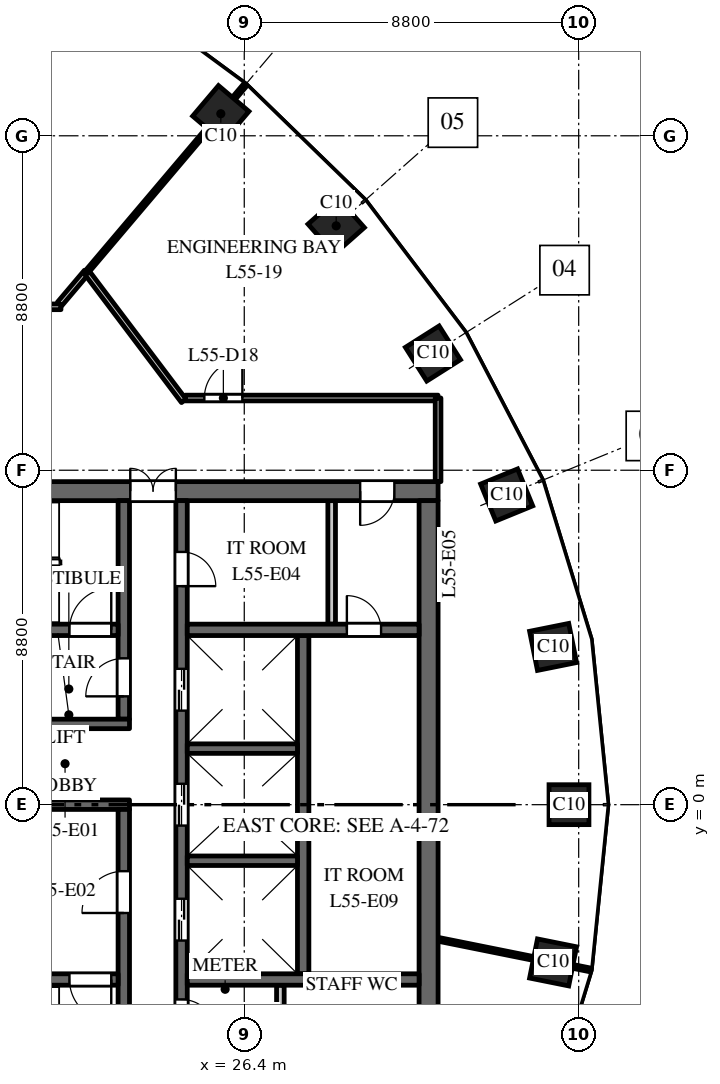
"""IFC4 building model, lengths in metres.
Left out: names, types, materials, properties, quantities, classifications, styles, units other than length and angle.
Written with IfcOpenShell. Run it as: python <this file> out.ifc"""

import sys

from ifc_helpers import new_model, si_unit, direction, frame, frame_2d, origin, origin_2d, place, context, subcontext, project, spatial, rectangle, extrude, element, fill, save


model = new_model("IFC4")
c1 = context("Model", 3, precision=1e-05, world=origin(), true_north=direction((0.0, 1.0)))
c2 = subcontext(c1, "Body", "Model", "MODEL_VIEW")
j1 = project(units=[si_unit("LENGTHUNIT", "METRE"), si_unit("PLANEANGLEUNIT", "RADIAN")], contexts=[c1])
p1 = place(None, origin())
s1 = spatial("IfcSite", under=j1, at=p1, CompositionType="ELEMENT")
p2 = place(p1, origin())
s2 = spatial("IfcBuilding", under=s1, at=p2, CompositionType="ELEMENT")
p3 = place(p2, frame((0.0, 0.0, 261.5)))
s3 = spatial("IfcBuildingStorey", under=s2, at=p3, CompositionType="ELEMENT", Elevation=261.5)
for number, where, z_axis, x_axis in (
    (1, (34.945, 0.0, 0.0), (0.0, 0.0, 1.0), (0.0, 1.0, 0.0)),
    (2, (34.527, 4.151, 0.0), (0.0, 0.0, 1.0), (-0.197, 0.98, 0.0)),
    (3, (33.305, 8.149, 0.0), (0.0, 0.0, 1.0), (-0.379, 0.925, 0.0)),
    (4, (31.365, 11.871, 0.0), (0.0, 0.0, 1.0), (-0.535, 0.845, 0.0)),
    (5, (28.819, 15.23, 0.0), (0.0, 0.0, 1.0), (-0.663, 0.749, 0.0)),
    (6, (25.783, 18.18, 0.0), (0.0, 0.0, 1.0), (-0.763, 0.646, 0.0)),
    (7, (34.527, -4.151, 0.0), (0.0, 0.0, 1.0), (0.197, 0.98, 0.0)),
):
    element("IfcColumn", number, at=place(p3, frame(where, z_axis=z_axis, x_axis=x_axis)), inside=s3, PredefinedType="COLUMN", context=c2, shape_type="SweptSolid", body=[
        extrude(rectangle(XDim=1.05, YDim=1.05, at=origin_2d()), origin(), (0.0, 0.0, 1.0), 4.0),
    ])
p4 = place(p3, frame((16.5, 8.25, 0.0), z_axis=(0.0, 0.0, 1.0), x_axis=(1.0, 0.0, 0.0)))
e8 = element("IfcWall", 8, at=p4, inside=s3, PredefinedType="SHEAR", context=c2, shape_type="SweptSolid", body=[
    extrude(rectangle(XDim=15.0, YDim=0.5, at=frame_2d((7.5, 0.0))), origin(), (0.0, 0.0, 1.0), 3.7),
])
p5 = place(p4, frame((6.9, 0.0, 0.0)))
e9 = element("IfcOpeningElement", 9, at=p5, cuts=e8, PredefinedType="OPENING", context=c2, shape_type="SweptSolid", body=[
    extrude(rectangle(XDim=1.2, YDim=2.1, at=frame_2d((0.6, 1.05))), frame((0.0, 0.26, 0.0), z_axis=(0.0, -1.0, 0.0), x_axis=(1.0, 0.0, 0.0)), (0.0, 0.0, 1.0), 0.52),
])
p6 = place(p4, frame((12.95, 0.0, 0.0)))
e10 = element("IfcOpeningElement", 10, at=p6, cuts=e8, PredefinedType="OPENING", context=c2, shape_type="SweptSolid", body=[
    extrude(rectangle(XDim=0.9, YDim=2.1, at=frame_2d((0.45, 1.05))), frame((0.0, 0.26, 0.0), z_axis=(0.0, -1.0, 0.0), x_axis=(1.0, 0.0, 0.0)), (0.0, 0.0, 1.0), 0.52),
])
p7 = place(p3, frame((27.95, -4.45, 0.0), z_axis=(0.0, 0.0, 1.0), x_axis=(0.0, 1.0, 0.0)))
e11 = element("IfcWall", 11, at=p7, inside=s3, PredefinedType="SHEAR", context=c2, shape_type="SweptSolid", body=[
    extrude(rectangle(XDim=8.9, YDim=0.3, at=frame_2d((4.45, 0.0))), origin(), (0.0, 0.0, 1.0), 3.7),
])
p8 = place(p3, frame((24.75, -8.0, 0.0), z_axis=(0.0, 0.0, 1.0), x_axis=(0.0, 1.0, 0.0)))
e12 = element("IfcWall", 12, at=p8, inside=s3, PredefinedType="SHEAR", context=c2, shape_type="SweptSolid", body=[
    extrude(rectangle(XDim=16.0, YDim=0.3, at=frame_2d((8.0, 0.0))), origin(), (0.0, 0.0, 1.0), 3.7),
])
p9 = place(p8, frame((4.425, 0.0, 0.0)))
e13 = element("IfcOpeningElement", 13, at=p9, cuts=e12, PredefinedType="OPENING", context=c2, shape_type="SweptSolid", body=[
    extrude(rectangle(XDim=1.1, YDim=2.1, at=frame_2d((0.55, 1.05))), frame((0.0, 0.16, 0.0), z_axis=(0.0, -1.0, 0.0), x_axis=(1.0, 0.0, 0.0)), (0.0, 0.0, 1.0), 0.32),
])
p10 = place(p8, frame((7.45, 0.0, 0.0)))
e14 = element("IfcOpeningElement", 14, at=p10, cuts=e12, PredefinedType="OPENING", context=c2, shape_type="SweptSolid", body=[
    extrude(rectangle(XDim=1.1, YDim=2.1, at=frame_2d((0.55, 1.05))), frame((0.0, 0.16, 0.0), z_axis=(0.0, -1.0, 0.0), x_axis=(1.0, 0.0, 0.0)), (0.0, 0.0, 1.0), 0.32),
])
p11 = place(p8, frame((10.475, 0.0, 0.0)))
e15 = element("IfcOpeningElement", 15, at=p11, cuts=e12, PredefinedType="OPENING", context=c2, shape_type="SweptSolid", body=[
    extrude(rectangle(XDim=1.1, YDim=2.1, at=frame_2d((0.55, 1.05))), frame((0.0, 0.16, 0.0), z_axis=(0.0, -1.0, 0.0), x_axis=(1.0, 0.0, 0.0)), (0.0, 0.0, 1.0), 0.32),
])
p12 = place(p8, frame((13.75, 0.0, 0.0)))
e16 = element("IfcOpeningElement", 16, at=p12, cuts=e12, PredefinedType="OPENING", context=c2, shape_type="SweptSolid", body=[
    extrude(rectangle(XDim=0.9, YDim=2.1, at=frame_2d((0.45, 1.05))), frame((0.0, 0.16, 0.0), z_axis=(0.0, -1.0, 0.0), x_axis=(1.0, 0.0, 0.0)), (0.0, 0.0, 1.0), 0.32),
])
p13 = place(p8, frame((1.975, 0.0, 0.0)))
e17 = element("IfcOpeningElement", 17, at=p13, cuts=e12, PredefinedType="OPENING", context=c2, shape_type="SweptSolid", body=[
    extrude(rectangle(XDim=0.9, YDim=2.1, at=frame_2d((0.45, 1.05))), frame((0.0, 0.16, 0.0), z_axis=(0.0, -1.0, 0.0), x_axis=(1.0, 0.0, 0.0)), (0.0, 0.0, 1.0), 0.32),
])
p14 = place(p8, frame((0.35, 0.0, 0.0)))
e18 = element("IfcOpeningElement", 18, at=p14, cuts=e12, PredefinedType="OPENING", context=c2, shape_type="SweptSolid", body=[
    extrude(rectangle(XDim=0.9, YDim=2.1, at=frame_2d((0.45, 1.05))), frame((0.0, 0.16, 0.0), z_axis=(0.0, -1.0, 0.0), x_axis=(1.0, 0.0, 0.0)), (0.0, 0.0, 1.0), 0.32),
])
p15 = place(p3, frame((20.1, 0.0, 0.0), z_axis=(0.0, 0.0, 1.0), x_axis=(1.0, 0.0, 0.0)))
e19 = element("IfcWall", 19, at=p15, inside=s3, PredefinedType="SHEAR", context=c2, shape_type="SweptSolid", body=[
    extrude(rectangle(XDim=3.28, YDim=0.25, at=frame_2d((1.64, 0.0))), origin(), (0.0, 0.0, 1.0), 3.7),
])
p16 = place(p3, frame((31.25, -8.0, 0.0), z_axis=(0.0, 0.0, 1.0), x_axis=(0.0, 1.0, 0.0)))
e20 = element("IfcWall", 20, at=p16, inside=s3, PredefinedType="SHEAR", context=c2, shape_type="SweptSolid", body=[
    extrude(rectangle(XDim=16.0, YDim=0.5, at=frame_2d((8.0, 0.0))), origin(), (0.0, 0.0, 1.0), 3.7),
])
p17 = place(p3, frame((24.9, 4.6, 0.0), z_axis=(0.0, 0.0, 1.0), x_axis=(1.0, 0.0, 0.0)))
e21 = element("IfcWall", 21, at=p17, inside=s3, PredefinedType="SHEAR", context=c2, shape_type="SweptSolid", body=[
    extrude(rectangle(XDim=6.1, YDim=0.3, at=frame_2d((3.05, 0.0))), origin(), (0.0, 0.0, 1.0), 3.7),
])
p18 = place(p17, frame((4.2, 0.0, 0.0)))
e22 = element("IfcOpeningElement", 22, at=p18, cuts=e21, PredefinedType="OPENING", context=c2, shape_type="SweptSolid", body=[
    extrude(rectangle(XDim=0.9, YDim=2.1, at=frame_2d((0.45, 1.05))), frame((0.0, 0.16, 0.0), z_axis=(0.0, -1.0, 0.0), x_axis=(1.0, 0.0, 0.0)), (0.0, 0.0, 1.0), 0.32),
])
for number, where, z_axis, x_axis in (
    (23, (28.7, 4.75, 0.0), (0.0, 0.0, 1.0), (0.0, 1.0, 0.0)),
    (24, (27.35, -8.0, 0.0), (0.0, 0.0, 1.0), (0.0, 1.0, 0.0)),
):
    element("IfcWall", number, at=place(p3, frame(where, z_axis=z_axis, x_axis=x_axis)), inside=s3, PredefinedType="PARTITIONING", context=c2, shape_type="SweptSolid", body=[
        extrude(rectangle(XDim=3.25, YDim=0.2, at=frame_2d((1.625, 0.0))), origin(), (0.0, 0.0, 1.0), 3.7),
    ])
p19 = place(p3, frame((24.9, -4.6, 0.0), z_axis=(0.0, 0.0, 1.0), x_axis=(1.0, 0.0, 0.0)))
e25 = element("IfcWall", 25, at=p19, inside=s3, PredefinedType="SHEAR", context=c2, shape_type="SweptSolid", body=[
    extrude(rectangle(XDim=6.1, YDim=0.3, at=frame_2d((3.05, 0.0))), origin(), (0.0, 0.0, 1.0), 3.7),
])
for number, where, z_axis, x_axis in (
    (26, (24.9, -1.475, 0.0), (0.0, 0.0, 1.0), (1.0, 0.0, 0.0)),
    (27, (24.9, 1.475, 0.0), (0.0, 0.0, 1.0), (1.0, 0.0, 0.0)),
):
    element("IfcWall", number, at=place(p3, frame(where, z_axis=z_axis, x_axis=x_axis)), inside=s3, PredefinedType="SHEAR", context=c2, shape_type="SweptSolid", body=[
        extrude(rectangle(XDim=2.9, YDim=0.25, at=frame_2d((1.45, 0.0))), origin(), (0.0, 0.0, 1.0), 3.7),
    ])
p20 = place(p3, frame((23.23, 2.25, 0.0), z_axis=(0.0, 0.0, 1.0), x_axis=(0.0, 1.0, 0.0)))
e28 = element("IfcWall", 28, at=p20, inside=s3, PredefinedType="SHEAR", context=c2, shape_type="SweptSolid", body=[
    extrude(rectangle(XDim=5.75, YDim=0.3, at=frame_2d((2.875, 0.0))), origin(), (0.0, 0.0, 1.0), 3.7),
])
p21 = place(p20, frame((0.6, 0.0, 0.0)))
e29 = element("IfcOpeningElement", 29, at=p21, cuts=e28, PredefinedType="OPENING", context=c2, shape_type="SweptSolid", body=[
    extrude(rectangle(XDim=1.0, YDim=2.1, at=frame_2d((0.5, 1.05))), frame((0.0, 0.16, 0.0), z_axis=(0.0, -1.0, 0.0), x_axis=(1.0, 0.0, 0.0)), (0.0, 0.0, 1.0), 0.32),
])
p22 = place(p3, frame((23.23, -8.0, 0.0), z_axis=(0.0, 0.0, 1.0), x_axis=(0.0, 1.0, 0.0)))
e30 = element("IfcWall", 30, at=p22, inside=s3, PredefinedType="SHEAR", context=c2, shape_type="SweptSolid", body=[
    extrude(rectangle(XDim=7.875, YDim=0.3, at=frame_2d((3.938, 0.0))), origin(), (0.0, 0.0, 1.0), 3.7),
])
p23 = place(p22, frame((5.15, 0.0, 0.0)))
e31 = element("IfcOpeningElement", 31, at=p23, cuts=e30, PredefinedType="OPENING", context=c2, shape_type="SweptSolid", body=[
    extrude(rectangle(XDim=1.1, YDim=2.1, at=frame_2d((0.55, 1.05))), frame((0.0, 0.16, 0.0), z_axis=(0.0, -1.0, 0.0), x_axis=(1.0, 0.0, 0.0)), (0.0, 0.0, 1.0), 0.32),
])
p24 = place(p3, frame((16.9, 4.6, 0.0), z_axis=(0.0, 0.0, 1.0), x_axis=(1.0, 0.0, 0.0)))
e32 = element("IfcWall", 32, at=p24, inside=s3, PredefinedType="SHEAR", context=c2, shape_type="SweptSolid", body=[
    extrude(rectangle(XDim=6.18, YDim=0.3, at=frame_2d((3.09, 0.0))), origin(), (0.0, 0.0, 1.0), 3.7),
])
p25 = place(p24, frame((4.9, 0.0, 0.0)))
e33 = element("IfcOpeningElement", 33, at=p25, cuts=e32, PredefinedType="OPENING", context=c2, shape_type="SweptSolid", body=[
    extrude(rectangle(XDim=1.1, YDim=2.1, at=frame_2d((0.55, 1.05))), frame((0.0, 0.16, 0.0), z_axis=(0.0, -1.0, 0.0), x_axis=(1.0, 0.0, 0.0)), (0.0, 0.0, 1.0), 0.32),
])
p26 = place(p3, frame((16.9, -4.6, 0.0), z_axis=(0.0, 0.0, 1.0), x_axis=(1.0, 0.0, 0.0)))
e34 = element("IfcWall", 34, at=p26, inside=s3, PredefinedType="SHEAR", context=c2, shape_type="SweptSolid", body=[
    extrude(rectangle(XDim=6.18, YDim=0.3, at=frame_2d((3.09, 0.0))), origin(), (0.0, 0.0, 1.0), 3.7),
])
p27 = place(p26, frame((4.9, 0.0, 0.0)))
e35 = element("IfcOpeningElement", 35, at=p27, cuts=e34, PredefinedType="OPENING", context=c2, shape_type="SweptSolid", body=[
    extrude(rectangle(XDim=1.1, YDim=2.1, at=frame_2d((0.55, 1.05))), frame((0.0, 0.16, 0.0), z_axis=(0.0, -1.0, 0.0), x_axis=(1.0, 0.0, 0.0)), (0.0, 0.0, 1.0), 0.32),
])
p28 = place(p3, frame((20.85, 2.125, 0.0), z_axis=(0.0, 0.0, 1.0), x_axis=(1.0, 0.0, 0.0)))
e36 = element("IfcWall", 36, at=p28, inside=s3, PredefinedType="SHEAR", context=c2, shape_type="SweptSolid", body=[
    extrude(rectangle(XDim=2.53, YDim=0.25, at=frame_2d((1.265, 0.0))), origin(), (0.0, 0.0, 1.0), 3.7),
])
p29 = place(p3, frame((7.524, 13.1, 0.0), z_axis=(0.0, 0.0, 1.0), x_axis=(1.0, 0.0, 0.0)))
e37 = element("IfcWall", 37, at=p29, inside=s3, PredefinedType="PARTITIONING", context=c2, shape_type="SweptSolid", body=[
    extrude(rectangle(XDim=14.052, YDim=0.15, at=frame_2d((7.026, 0.0))), origin(), (0.0, 0.0, 1.0), 2.85),
])
p30 = place(p29, frame((0.554, 0.0, 0.0)))
e38 = element("IfcOpeningElement", 38, at=p30, cuts=e37, PredefinedType="OPENING", context=c2, shape_type="SweptSolid", body=[
    extrude(rectangle(XDim=1.0, YDim=2.1, at=frame_2d((0.5, 1.05))), frame((0.0, 0.085, 0.0), z_axis=(0.0, -1.0, 0.0), x_axis=(1.0, 0.0, 0.0)), (0.0, 0.0, 1.0), 0.17),
])
p31 = place(p3, frame((21.541, 13.175, 0.0), z_axis=(0.0, 0.0, 1.0), x_axis=(0.646460291141, 0.762947633837, 0.0)))
e39 = element("IfcWall", 39, at=p31, inside=s3, PredefinedType="PARTITIONING", context=c2, shape_type="SweptSolid", body=[
    extrude(rectangle(XDim=1.098, YDim=0.15, at=frame_2d((0.549, 0.0))), origin(), (0.0, 0.0, 1.0), 3.7),
])
p32 = place(p3, frame((22.251, 14.013, 0.0), z_axis=(0.0, 0.0, 1.0), x_axis=(0.602435944628, -0.798167233492, 0.0)))
e40 = element("IfcWall", 40, at=p32, inside=s3, PredefinedType="PARTITIONING", context=c2, shape_type="SweptSolid", body=[
    extrude(rectangle(XDim=4.245, YDim=0.15, at=frame_2d((2.122, 0.0))), origin(), (0.0, 0.0, 1.0), 2.75),
])
p33 = place(p3, frame((22.251, 14.013, 0.0), z_axis=(0.0, 0.0, 1.0), x_axis=(0.646448300096, 0.76295779392, 0.0)))
e41 = element("IfcWall", 41, at=p33, inside=s3, PredefinedType="PARTITIONING", context=c2, shape_type="SweptSolid", body=[
    extrude(rectangle(XDim=6.465, YDim=0.1, at=frame_2d((3.232, 0.0))), origin(), (0.0, 0.0, 1.0), 3.0),
])
p34 = place(p3, frame((24.845, 10.7, 0.0), z_axis=(0.0, 0.0, 1.0), x_axis=(1.0, 0.0, 0.0)))
e42 = element("IfcWall", 42, at=p34, inside=s3, PredefinedType="PARTITIONING", context=c2, shape_type="SweptSolid", body=[
    extrude(rectangle(XDim=6.655, YDim=0.15, at=frame_2d((3.328, 0.0))), origin(), (0.0, 0.0, 1.0), 3.0),
])
p35 = place(p34, frame((0.505, 0.0, 0.0)))
e43 = element("IfcOpeningElement", 43, at=p35, cuts=e42, PredefinedType="OPENING", context=c2, shape_type="SweptSolid", body=[
    extrude(rectangle(XDim=1.0, YDim=2.1, at=frame_2d((0.5, 1.05))), frame((0.0, 0.085, 0.0), z_axis=(0.0, -1.0, 0.0), x_axis=(1.0, 0.0, 0.0)), (0.0, 0.0, 1.0), 0.17),
])
p36 = place(p3, frame((31.5, -3.542, 0.0), z_axis=(0.0, 0.0, 1.0), x_axis=(0.980357474535, -0.197228857227, 0.0)))
e44 = element("IfcWall", 44, at=p36, inside=s3, PredefinedType="PARTITIONING", context=c2, shape_type="SweptSolid", body=[
    extrude(rectangle(XDim=4.092, YDim=0.1, at=frame_2d((2.046, 0.0))), origin(), (0.0, 0.0, 1.0), 3.0),
])
p37 = place(p3, frame((31.5, 8.5, 0.0), z_axis=(0.0, 0.0, 1.0), x_axis=(0.0, 1.0, 0.0)))
e45 = element("IfcWall", 45, at=p37, inside=s3, PredefinedType="PARTITIONING", context=c2, shape_type="SweptSolid", body=[
    extrude(rectangle(XDim=2.2, YDim=0.15, at=frame_2d((1.1, 0.0))), origin(), (0.0, 0.0, 1.0), 3.0),
])
p38 = place(p9, origin())
e46 = element("IfcDoor", 46, at=p38, inside=s3, OperationType="DOUBLE_DOOR_SLIDING", PredefinedType="DOOR", context=c2, shape_type="SweptSolid", body=[
    extrude(rectangle(XDim=1.1, YDim=2.1, at=frame_2d((0.55, 1.05))), frame((0.0, 0.025, 0.0), z_axis=(0.0, -1.0, 0.0), x_axis=(1.0, 0.0, 0.0)), (0.0, 0.0, 1.0), 0.05),
])
fill(e13, e46)
p39 = place(p10, origin())
e47 = element("IfcDoor", 47, at=p39, inside=s3, OperationType="DOUBLE_DOOR_SLIDING", PredefinedType="DOOR", context=c2, shape_type="SweptSolid", body=[
    extrude(rectangle(XDim=1.1, YDim=2.1, at=frame_2d((0.55, 1.05))), frame((0.0, 0.025, 0.0), z_axis=(0.0, -1.0, 0.0), x_axis=(1.0, 0.0, 0.0)), (0.0, 0.0, 1.0), 0.05),
])
fill(e14, e47)
p40 = place(p11, origin())
e48 = element("IfcDoor", 48, at=p40, inside=s3, OperationType="DOUBLE_DOOR_SLIDING", PredefinedType="DOOR", context=c2, shape_type="SweptSolid", body=[
    extrude(rectangle(XDim=1.1, YDim=2.1, at=frame_2d((0.55, 1.05))), frame((0.0, 0.025, 0.0), z_axis=(0.0, -1.0, 0.0), x_axis=(1.0, 0.0, 0.0)), (0.0, 0.0, 1.0), 0.05),
])
fill(e15, e48)
p41 = place(p25, origin())
e49 = element("IfcDoor", 49, at=p41, inside=s3, OperationType="SINGLE_SWING_LEFT", PredefinedType="DOOR", context=c2, shape_type="SweptSolid", body=[
    extrude(rectangle(XDim=1.1, YDim=2.1, at=frame_2d((0.55, 1.05))), frame((0.0, 0.025, 0.0), z_axis=(0.0, -1.0, 0.0), x_axis=(1.0, 0.0, 0.0)), (0.0, 0.0, 1.0), 0.05),
])
fill(e33, e49)
p42 = place(p27, origin())
e50 = element("IfcDoor", 50, at=p42, inside=s3, OperationType="SINGLE_SWING_RIGHT", PredefinedType="DOOR", context=c2, shape_type="SweptSolid", body=[
    extrude(rectangle(XDim=1.1, YDim=2.1, at=frame_2d((0.55, 1.05))), frame((0.0, 0.025, 0.0), z_axis=(0.0, -1.0, 0.0), x_axis=(1.0, 0.0, 0.0)), (0.0, 0.0, 1.0), 0.05),
])
fill(e35, e50)
p43 = place(p23, origin())
e51 = element("IfcDoor", 51, at=p43, inside=s3, OperationType="SINGLE_SWING_RIGHT", PredefinedType="DOOR", context=c2, shape_type="SweptSolid", body=[
    extrude(rectangle(XDim=1.1, YDim=2.1, at=frame_2d((0.55, 1.05))), frame((0.0, 0.025, 0.0), z_axis=(0.0, -1.0, 0.0), x_axis=(1.0, 0.0, 0.0)), (0.0, 0.0, 1.0), 0.05),
])
fill(e31, e51)
p44 = place(p21, origin())
e52 = element("IfcDoor", 52, at=p44, inside=s3, OperationType="SINGLE_SWING_RIGHT", PredefinedType="DOOR", context=c2, shape_type="SweptSolid", body=[
    extrude(rectangle(XDim=1.0, YDim=2.1, at=frame_2d((0.5, 1.05))), frame((0.0, 0.025, 0.0), z_axis=(0.0, -1.0, 0.0), x_axis=(1.0, 0.0, 0.0)), (0.0, 0.0, 1.0), 0.05),
])
fill(e29, e52)
p45 = place(p5, origin())
e53 = element("IfcDoor", 53, at=p45, inside=s3, OperationType="DOUBLE_DOOR_DOUBLE_SWING", PredefinedType="DOOR", context=c2, shape_type="SweptSolid", body=[
    extrude(rectangle(XDim=1.2, YDim=2.1, at=frame_2d((0.6, 1.05))), frame((0.0, 0.025, 0.0), z_axis=(0.0, -1.0, 0.0), x_axis=(1.0, 0.0, 0.0)), (0.0, 0.0, 1.0), 0.05),
])
fill(e9, e53)
p46 = place(p12, origin())
e54 = element("IfcDoor", 54, at=p46, inside=s3, OperationType="SINGLE_SWING_LEFT", PredefinedType="DOOR", context=c2, shape_type="SweptSolid", body=[
    extrude(rectangle(XDim=0.9, YDim=2.1, at=frame_2d((0.45, 1.05))), frame((0.0, 0.025, 0.0), z_axis=(0.0, -1.0, 0.0), x_axis=(1.0, 0.0, 0.0)), (0.0, 0.0, 1.0), 0.05),
])
fill(e16, e54)
p47 = place(p6, origin())
e55 = element("IfcDoor", 55, at=p47, inside=s3, OperationType="SINGLE_SWING_LEFT", PredefinedType="DOOR", context=c2, shape_type="SweptSolid", body=[
    extrude(rectangle(XDim=0.9, YDim=2.1, at=frame_2d((0.45, 1.05))), frame((0.0, 0.025, 0.0), z_axis=(0.0, -1.0, 0.0), x_axis=(1.0, 0.0, 0.0)), (0.0, 0.0, 1.0), 0.05),
])
fill(e10, e55)
p48 = place(p13, origin())
e56 = element("IfcDoor", 56, at=p48, inside=s3, OperationType="SINGLE_SWING_LEFT", PredefinedType="DOOR", context=c2, shape_type="SweptSolid", body=[
    extrude(rectangle(XDim=0.9, YDim=2.1, at=frame_2d((0.45, 1.05))), frame((0.0, 0.025, 0.0), z_axis=(0.0, -1.0, 0.0), x_axis=(1.0, 0.0, 0.0)), (0.0, 0.0, 1.0), 0.05),
])
fill(e17, e56)
p49 = place(p18, origin())
e57 = element("IfcDoor", 57, at=p49, inside=s3, OperationType="SINGLE_SWING_RIGHT", PredefinedType="DOOR", context=c2, shape_type="SweptSolid", body=[
    extrude(rectangle(XDim=0.9, YDim=2.1, at=frame_2d((0.45, 1.05))), frame((0.0, 0.025, 0.0), z_axis=(0.0, -1.0, 0.0), x_axis=(1.0, 0.0, 0.0)), (0.0, 0.0, 1.0), 0.05),
])
fill(e22, e57)
p50 = place(p35, origin())
e58 = element("IfcDoor", 58, at=p50, inside=s3, OperationType="SINGLE_SWING_RIGHT", PredefinedType="DOOR", context=c2, shape_type="SweptSolid", body=[
    extrude(rectangle(XDim=1.0, YDim=2.1, at=frame_2d((0.5, 1.05))), frame((0.0, 0.025, 0.0), z_axis=(0.0, -1.0, 0.0), x_axis=(1.0, 0.0, 0.0)), (0.0, 0.0, 1.0), 0.05),
])
fill(e43, e58)
save(model, sys.argv[1])
